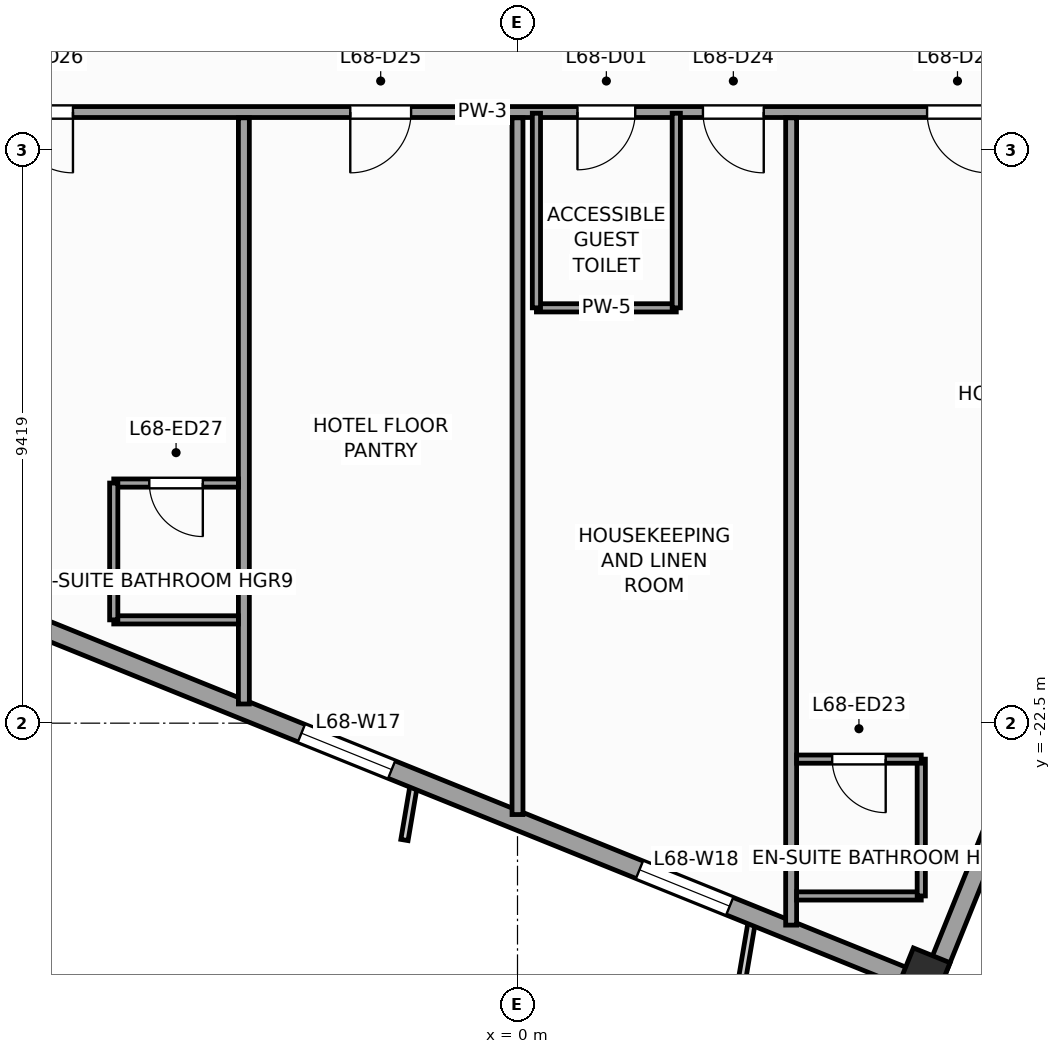
"""IFC4 building model, lengths in metres.
Left out: names, types, materials, properties, quantities, classifications, styles, units other than length and angle.
Written with IfcOpenShell. Run it as: python <this file> out.ifc"""

import sys

from ifc_helpers import new_model, si_unit, direction, frame, frame_2d, origin, origin_2d, place, context, subcontext, project, spatial, rectangle, extrude, source, transform, mapped, element, fill, save


model = new_model("IFC4")
c1 = context("Model", 3, precision=1e-05, world=origin(), true_north=direction((0.0, 1.0)))
c2 = subcontext(c1, "Body", "Model", "MODEL_VIEW")
j1 = project(units=[si_unit("LENGTHUNIT", "METRE"), si_unit("PLANEANGLEUNIT", "RADIAN")], contexts=[c1])
p1 = place(None, origin())
s1 = spatial("IfcSite", under=j1, at=p1, CompositionType="ELEMENT")
p2 = place(p1, origin())
s2 = spatial("IfcBuilding", under=s1, at=p2, CompositionType="ELEMENT")
p3 = place(p2, frame((0.0, 0.0, 279.6)))
s3 = spatial("IfcBuildingStorey", under=s2, at=p3, CompositionType="ELEMENT", Elevation=279.6)
m1 = source(origin(), c2, "Body", "SweptSolid", [
    extrude(rectangle(XDim=0.65, YDim=0.65, at=origin_2d()), origin(), (0.0, 0.0, 1.0), 3.6),
])
p4 = place(p3, frame((6.69, -26.62, 0.0), z_axis=(0.0, 0.0, 1.0), x_axis=(0.374606593416, 0.927183854567, 0.0)))
e1 = element("IfcColumn", 1, at=p4, inside=s3, PredefinedType="COLUMN", context=c2, shape_type="MappedRepresentation", body=[
    mapped(m1, transform((0.0, 0.0, 0.0), scale=1.0)),
])
p5 = place(p3, frame((-23.813, -14.479, 0.0), z_axis=(0.0, 0.0, 1.0), x_axis=(0.927182657188, -0.374609557019, 0.0)))
e2 = element("IfcWall", 2, at=p5, inside=s3, PredefinedType="STANDARD", context=c2, shape_type="SweptSolid", body=[
    extrude(rectangle(XDim=33.31, YDim=0.31, at=frame_2d((16.655, 0.0))), origin(), (0.0, 0.0, 1.0), 2.75),
])
p6 = place(p5, frame((3.197, 0.0, 0.47)))
e3 = element("IfcOpeningElement", 3, at=p6, cuts=e2, PredefinedType="OPENING", context=c2, shape_type="SweptSolid", body=[
    extrude(rectangle(XDim=1.6, YDim=2.1, at=frame_2d((0.8, 1.05))), frame((0.0, 0.165, 0.0), z_axis=(0.0, -1.0, 0.0), x_axis=(1.0, 0.0, 0.0)), (0.0, 0.0, 1.0), 0.33),
])
p7 = place(p5, frame((8.86, 0.0, 0.47)))
e4 = element("IfcOpeningElement", 4, at=p7, cuts=e2, PredefinedType="OPENING", context=c2, shape_type="SweptSolid", body=[
    extrude(rectangle(XDim=1.6, YDim=2.1, at=frame_2d((0.8, 1.05))), frame((0.0, 0.165, 0.0), z_axis=(0.0, -1.0, 0.0), x_axis=(1.0, 0.0, 0.0)), (0.0, 0.0, 1.0), 0.33),
])
p8 = place(p5, frame((14.439, 0.0, 0.47)))
e5 = element("IfcOpeningElement", 5, at=p8, cuts=e2, PredefinedType="OPENING", context=c2, shape_type="SweptSolid", body=[
    extrude(rectangle(XDim=1.6, YDim=2.1, at=frame_2d((0.8, 1.05))), frame((0.0, 0.165, 0.0), z_axis=(0.0, -1.0, 0.0), x_axis=(1.0, 0.0, 0.0)), (0.0, 0.0, 1.0), 0.33),
])
p9 = place(p5, frame((21.851, 0.0, 0.47)))
e6 = element("IfcOpeningElement", 6, at=p9, cuts=e2, PredefinedType="OPENING", context=c2, shape_type="SweptSolid", body=[
    extrude(rectangle(XDim=1.6, YDim=2.1, at=frame_2d((0.8, 1.05))), frame((0.0, 0.165, 0.0), z_axis=(0.0, -1.0, 0.0), x_axis=(1.0, 0.0, 0.0)), (0.0, 0.0, 1.0), 0.33),
])
p10 = place(p5, frame((27.847, 0.0, 0.47)))
e7 = element("IfcOpeningElement", 7, at=p10, cuts=e2, PredefinedType="OPENING", context=c2, shape_type="SweptSolid", body=[
    extrude(rectangle(XDim=1.6, YDim=2.1, at=frame_2d((0.8, 1.05))), frame((0.0, 0.165, 0.0), z_axis=(0.0, -1.0, 0.0), x_axis=(1.0, 0.0, 0.0)), (0.0, 0.0, 1.0), 0.33),
])
p11 = place(p3, frame((6.784, -26.841, 0.0), z_axis=(0.0, 0.0, 1.0), x_axis=(0.374636620962, 0.927171722085, 0.0)))
e8 = element("IfcWall", 8, at=p11, inside=s3, PredefinedType="STANDARD", context=c2, shape_type="SweptSolid", body=[
    extrude(rectangle(XDim=6.0, YDim=0.31, at=frame_2d((3.0, 0.0))), origin(), (0.0, 0.0, 1.0), 2.65),
])
p12 = place(p3, frame((-11.45, -12.45, 0.0), z_axis=(0.0, 0.0, 1.0), x_axis=(1.0, 0.0, 0.0)))
e9 = element("IfcWall", 9, at=p12, inside=s3, PredefinedType="PARTITIONING", context=c2, shape_type="SweptSolid", body=[
    extrude(rectangle(XDim=21.75, YDim=0.18, at=frame_2d((10.875, 0.0))), origin(), (0.0, 0.0, 1.0), 3.35),
])
p13 = place(p12, frame((12.436, 0.0, 0.0)))
e10 = element("IfcOpeningElement", 10, at=p13, cuts=e9, PredefinedType="OPENING", context=c2, shape_type="SweptSolid", body=[
    extrude(rectangle(XDim=0.95, YDim=2.1, at=frame_2d((0.475, 1.05))), frame((0.0, 0.1, 0.0), z_axis=(0.0, -1.0, 0.0), x_axis=(1.0, 0.0, 0.0)), (0.0, 0.0, 1.0), 0.2),
])
p14 = place(p12, frame((18.186, 0.0, 0.0)))
e11 = element("IfcOpeningElement", 11, at=p14, cuts=e9, PredefinedType="OPENING", context=c2, shape_type="SweptSolid", body=[
    extrude(rectangle(XDim=1.0, YDim=2.15, at=frame_2d((0.5, 1.075))), frame((0.0, 0.1, 0.0), z_axis=(0.0, -1.0, 0.0), x_axis=(1.0, 0.0, 0.0)), (0.0, 0.0, 1.0), 0.2),
])
p15 = place(p12, frame((14.5, 0.0, 0.0)))
e12 = element("IfcOpeningElement", 12, at=p15, cuts=e9, PredefinedType="OPENING", context=c2, shape_type="SweptSolid", body=[
    extrude(rectangle(XDim=1.0, YDim=2.15, at=frame_2d((0.5, 1.075))), frame((0.0, 0.1, 0.0), z_axis=(0.0, -1.0, 0.0), x_axis=(1.0, 0.0, 0.0)), (0.0, 0.0, 1.0), 0.2),
])
p16 = place(p12, frame((8.7, 0.0, 0.0)))
e13 = element("IfcOpeningElement", 13, at=p16, cuts=e9, PredefinedType="OPENING", context=c2, shape_type="SweptSolid", body=[
    extrude(rectangle(XDim=1.0, YDim=2.15, at=frame_2d((0.5, 1.075))), frame((0.0, 0.1, 0.0), z_axis=(0.0, -1.0, 0.0), x_axis=(1.0, 0.0, 0.0)), (0.0, 0.0, 1.0), 0.2),
])
p17 = place(p12, frame((3.139, 0.0, 0.0)))
e14 = element("IfcOpeningElement", 14, at=p17, cuts=e9, PredefinedType="OPENING", context=c2, shape_type="SweptSolid", body=[
    extrude(rectangle(XDim=1.0, YDim=2.15, at=frame_2d((0.5, 1.075))), frame((0.0, 0.1, 0.0), z_axis=(0.0, -1.0, 0.0), x_axis=(1.0, 0.0, 0.0)), (0.0, 0.0, 1.0), 0.2),
])
p18 = place(p3, frame((4.5, -12.545, 0.0), z_axis=(0.0, 0.0, 1.0), x_axis=(0.0, -1.0, 0.0)))
e15 = element("IfcWall", 15, at=p18, inside=s3, PredefinedType="PARTITIONING", context=c2, shape_type="SweptSolid", body=[
    extrude(rectangle(XDim=13.276, YDim=0.18, at=frame_2d((6.638, 0.0))), origin(), (0.0, 0.0, 1.0), 3.35),
])
p19 = place(p3, frame((0.0, -12.545, 0.0), z_axis=(0.0, 0.0, 1.0), x_axis=(0.0, -1.0, 0.0)))
e16 = element("IfcWall", 16, at=p19, inside=s3, PredefinedType="PARTITIONING", context=c2, shape_type="SweptSolid", body=[
    extrude(rectangle(XDim=11.458, YDim=0.18, at=frame_2d((5.729, 0.0))), origin(), (0.0, 0.0, 1.0), 3.35),
])
p20 = place(p3, frame((-4.5, -12.545, 0.0), z_axis=(0.0, 0.0, 1.0), x_axis=(0.0, -1.0, 0.0)))
e17 = element("IfcWall", 17, at=p20, inside=s3, PredefinedType="PARTITIONING", context=c2, shape_type="SweptSolid", body=[
    extrude(rectangle(XDim=9.64, YDim=0.18, at=frame_2d((4.82, 0.0))), origin(), (0.0, 0.0, 1.0), 3.35),
])
p21 = place(p3, frame((0.311, -15.67, 0.0), z_axis=(0.0, 0.0, 1.0), x_axis=(1.0, 0.0, 0.0)))
e18 = element("IfcWall", 18, at=p21, inside=s3, PredefinedType="PARTITIONING", context=c2, shape_type="SweptSolid", body=[
    extrude(rectangle(XDim=2.3, YDim=0.135, at=frame_2d((1.15, 0.0))), origin(), (0.0, 0.0, 1.0), 3.35),
])
for number, where, z_axis, x_axis in (
    (19, (2.611, -15.67, 0.0), (0.0, 0.0, 1.0), (0.0, 1.0, 0.0)),
    (20, (0.311, -15.67, 0.0), (0.0, 0.0, 1.0), (0.0, 1.0, 0.0)),
):
    element("IfcWall", number, at=place(p3, frame(where, z_axis=z_axis, x_axis=x_axis)), inside=s3, PredefinedType="PARTITIONING", context=c2, shape_type="SweptSolid", body=[
        extrude(rectangle(XDim=3.2, YDim=0.135, at=frame_2d((1.6, 0.0))), origin(), (0.0, 0.0, 1.0), 3.35),
    ])
p22 = place(p3, frame((4.59, -25.342, 0.0), z_axis=(0.0, 0.0, 1.0), x_axis=(1.0, 0.0, 0.0)))
e21 = element("IfcWall", 21, at=p22, inside=s3, PredefinedType="PARTITIONING", context=c2, shape_type="SweptSolid", body=[
    extrude(rectangle(XDim=2.05, YDim=0.135, at=frame_2d((1.025, 0.0))), origin(), (0.0, 0.0, 1.0), 3.35),
])
p23 = place(p3, frame((6.64, -25.342, 0.0), z_axis=(0.0, 0.0, 1.0), x_axis=(0.0, 1.0, 0.0)))
e22 = element("IfcWall", 22, at=p23, inside=s3, PredefinedType="PARTITIONING", context=c2, shape_type="SweptSolid", body=[
    extrude(rectangle(XDim=2.25, YDim=0.135, at=frame_2d((1.125, 0.0))), origin(), (0.0, 0.0, 1.0), 3.35),
])
p24 = place(p3, frame((4.59, -23.092, 0.0), z_axis=(0.0, 0.0, 1.0), x_axis=(1.0, 0.0, 0.0)))
e23 = element("IfcWall", 23, at=p24, inside=s3, PredefinedType="PARTITIONING", context=c2, shape_type="SweptSolid", body=[
    extrude(rectangle(XDim=2.05, YDim=0.135, at=frame_2d((1.025, 0.0))), origin(), (0.0, 0.0, 1.0), 3.35),
])
p25 = place(p24, frame((0.585, 0.0, 0.0)))
e24 = element("IfcOpeningElement", 24, at=p25, cuts=e23, PredefinedType="OPENING", context=c2, shape_type="SweptSolid", body=[
    extrude(rectangle(XDim=0.88, YDim=2.1, at=frame_2d((0.44, 1.05))), frame((0.0, 0.078, 0.0), z_axis=(0.0, -1.0, 0.0), x_axis=(1.0, 0.0, 0.0)), (0.0, 0.0, 1.0), 0.155),
])
p26 = place(p3, frame((-6.64, -20.801, 0.0), z_axis=(0.0, 0.0, 1.0), x_axis=(1.0, 0.0, 0.0)))
e25 = element("IfcWall", 25, at=p26, inside=s3, PredefinedType="PARTITIONING", context=c2, shape_type="SweptSolid", body=[
    extrude(rectangle(XDim=2.05, YDim=0.135, at=frame_2d((1.025, 0.0))), origin(), (0.0, 0.0, 1.0), 3.35),
])
p27 = place(p3, frame((-6.64, -18.551, 0.0), z_axis=(0.0, 0.0, 1.0), x_axis=(1.0, 0.0, 0.0)))
e26 = element("IfcWall", 26, at=p27, inside=s3, PredefinedType="PARTITIONING", context=c2, shape_type="SweptSolid", body=[
    extrude(rectangle(XDim=2.05, YDim=0.135, at=frame_2d((1.025, 0.0))), origin(), (0.0, 0.0, 1.0), 2.95),
])
p28 = place(p27, frame((0.585, 0.0, 0.0)))
e27 = element("IfcOpeningElement", 27, at=p28, cuts=e26, PredefinedType="OPENING", context=c2, shape_type="SweptSolid", body=[
    extrude(rectangle(XDim=0.88, YDim=2.1, at=frame_2d((0.44, 1.05))), frame((0.0, 0.078, 0.0), z_axis=(0.0, -1.0, 0.0), x_axis=(1.0, 0.0, 0.0)), (0.0, 0.0, 1.0), 0.155),
])
p29 = place(p3, frame((-6.64, -20.801, 0.0), z_axis=(0.0, 0.0, 1.0), x_axis=(0.0, 1.0, 0.0)))
e28 = element("IfcWall", 28, at=p29, inside=s3, PredefinedType="PARTITIONING", context=c2, shape_type="SweptSolid", body=[
    extrude(rectangle(XDim=2.25, YDim=0.135, at=frame_2d((1.125, 0.0))), origin(), (0.0, 0.0, 1.0), 3.35),
])
m2 = source(origin(), c2, "Body", "SweptSolid", [
    extrude(rectangle(XDim=1.6, YDim=2.1, at=frame_2d((0.8, 1.05))), frame((0.0, 0.03, 0.0), z_axis=(0.0, -1.0, 0.0), x_axis=(1.0, 0.0, 0.0)), (0.0, 0.0, 1.0), 0.06),
])
p30 = place(p9, origin())
e29 = element("IfcWindow", 29, at=p30, inside=s3, PartitioningType="SINGLE_PANEL", PredefinedType="WINDOW", context=c2, shape_type="MappedRepresentation", body=[
    mapped(m2, transform((0.0, 0.0, 0.0), scale=1.0)),
])
fill(e6, e29)
p31 = place(p10, origin())
e30 = element("IfcWindow", 30, at=p31, inside=s3, PartitioningType="SINGLE_PANEL", PredefinedType="WINDOW", context=c2, shape_type="MappedRepresentation", body=[
    mapped(m2, transform((0.0, 0.0, 0.0), scale=1.0)),
])
fill(e7, e30)
m3 = source(origin(), c2, "Body", "SweptSolid", [
    extrude(rectangle(XDim=0.95, YDim=2.1, at=frame_2d((0.475, 1.05))), frame((0.0, 0.025, 0.0), z_axis=(0.0, -1.0, 0.0), x_axis=(1.0, 0.0, 0.0)), (0.0, 0.0, 1.0), 0.05),
])
p32 = place(p13, frame((0.95, 0.0, 0.0), z_axis=(0.0, 0.0, 1.0), x_axis=(-1.0, 0.0, 0.0)))
e31 = element("IfcDoor", 31, at=p32, inside=s3, OperationType="SINGLE_SWING_LEFT", PredefinedType="DOOR", context=c2, shape_type="MappedRepresentation", body=[
    mapped(m3, transform((0.0, 0.0, 0.0), scale=1.0)),
])
fill(e10, e31)
m4 = source(origin(), c2, "Body", "SweptSolid", [
    extrude(rectangle(XDim=1.0, YDim=2.15, at=frame_2d((0.5, 1.075))), frame((0.0, 0.025, 0.0), z_axis=(0.0, -1.0, 0.0), x_axis=(1.0, 0.0, 0.0)), (0.0, 0.0, 1.0), 0.05),
])
p33 = place(p14, frame((1.0, 0.0, 0.0), z_axis=(0.0, 0.0, 1.0), x_axis=(-1.0, 0.0, 0.0)))
e32 = element("IfcDoor", 32, at=p33, inside=s3, OperationType="SINGLE_SWING_RIGHT", PredefinedType="DOOR", context=c2, shape_type="MappedRepresentation", body=[
    mapped(m4, transform((0.0, 0.0, 0.0), scale=1.0)),
])
fill(e11, e32)
m5 = source(origin(), c2, "Body", "SweptSolid", [
    extrude(rectangle(XDim=0.88, YDim=2.1, at=frame_2d((0.44, 1.05))), frame((0.0, 0.025, 0.0), z_axis=(0.0, -1.0, 0.0), x_axis=(1.0, 0.0, 0.0)), (0.0, 0.0, 1.0), 0.05),
])
p34 = place(p25, frame((0.88, 0.0, 0.0), z_axis=(0.0, 0.0, 1.0), x_axis=(-1.0, 0.0, 0.0)))
e33 = element("IfcDoor", 33, at=p34, inside=s3, OperationType="SINGLE_SWING_RIGHT", PredefinedType="DOOR", context=c2, shape_type="MappedRepresentation", body=[
    mapped(m5, transform((0.0, 0.0, 0.0), scale=1.0)),
])
fill(e24, e33)
p35 = place(p15, frame((1.0, 0.0, 0.0), z_axis=(0.0, 0.0, 1.0), x_axis=(-1.0, 0.0, 0.0)))
e34 = element("IfcDoor", 34, at=p35, inside=s3, OperationType="SINGLE_SWING_RIGHT", PredefinedType="DOOR", context=c2, shape_type="MappedRepresentation", body=[
    mapped(m4, transform((0.0, 0.0, 0.0), scale=1.0)),
])
fill(e12, e34)
p36 = place(p16, frame((1.0, 0.0, 0.0), z_axis=(0.0, 0.0, 1.0), x_axis=(-1.0, 0.0, 0.0)))
e35 = element("IfcDoor", 35, at=p36, inside=s3, OperationType="SINGLE_SWING_LEFT", PredefinedType="DOOR", context=c2, shape_type="MappedRepresentation", body=[
    mapped(m4, transform((0.0, 0.0, 0.0), scale=1.0)),
])
fill(e13, e35)
p37 = place(p17, frame((1.0, 0.0, 0.0), z_axis=(0.0, 0.0, 1.0), x_axis=(-1.0, 0.0, 0.0)))
e36 = element("IfcDoor", 36, at=p37, inside=s3, OperationType="SINGLE_SWING_RIGHT", PredefinedType="DOOR", context=c2, shape_type="MappedRepresentation", body=[
    mapped(m4, transform((0.0, 0.0, 0.0), scale=1.0)),
])
fill(e14, e36)
p38 = place(p28, frame((0.88, 0.0, 0.0), z_axis=(0.0, 0.0, 1.0), x_axis=(-1.0, 0.0, 0.0)))
e37 = element("IfcDoor", 37, at=p38, inside=s3, OperationType="SINGLE_SWING_RIGHT", PredefinedType="DOOR", context=c2, shape_type="MappedRepresentation", body=[
    mapped(m5, transform((0.0, 0.0, 0.0), scale=1.0)),
])
fill(e27, e37)
save(model, sys.argv[1])
